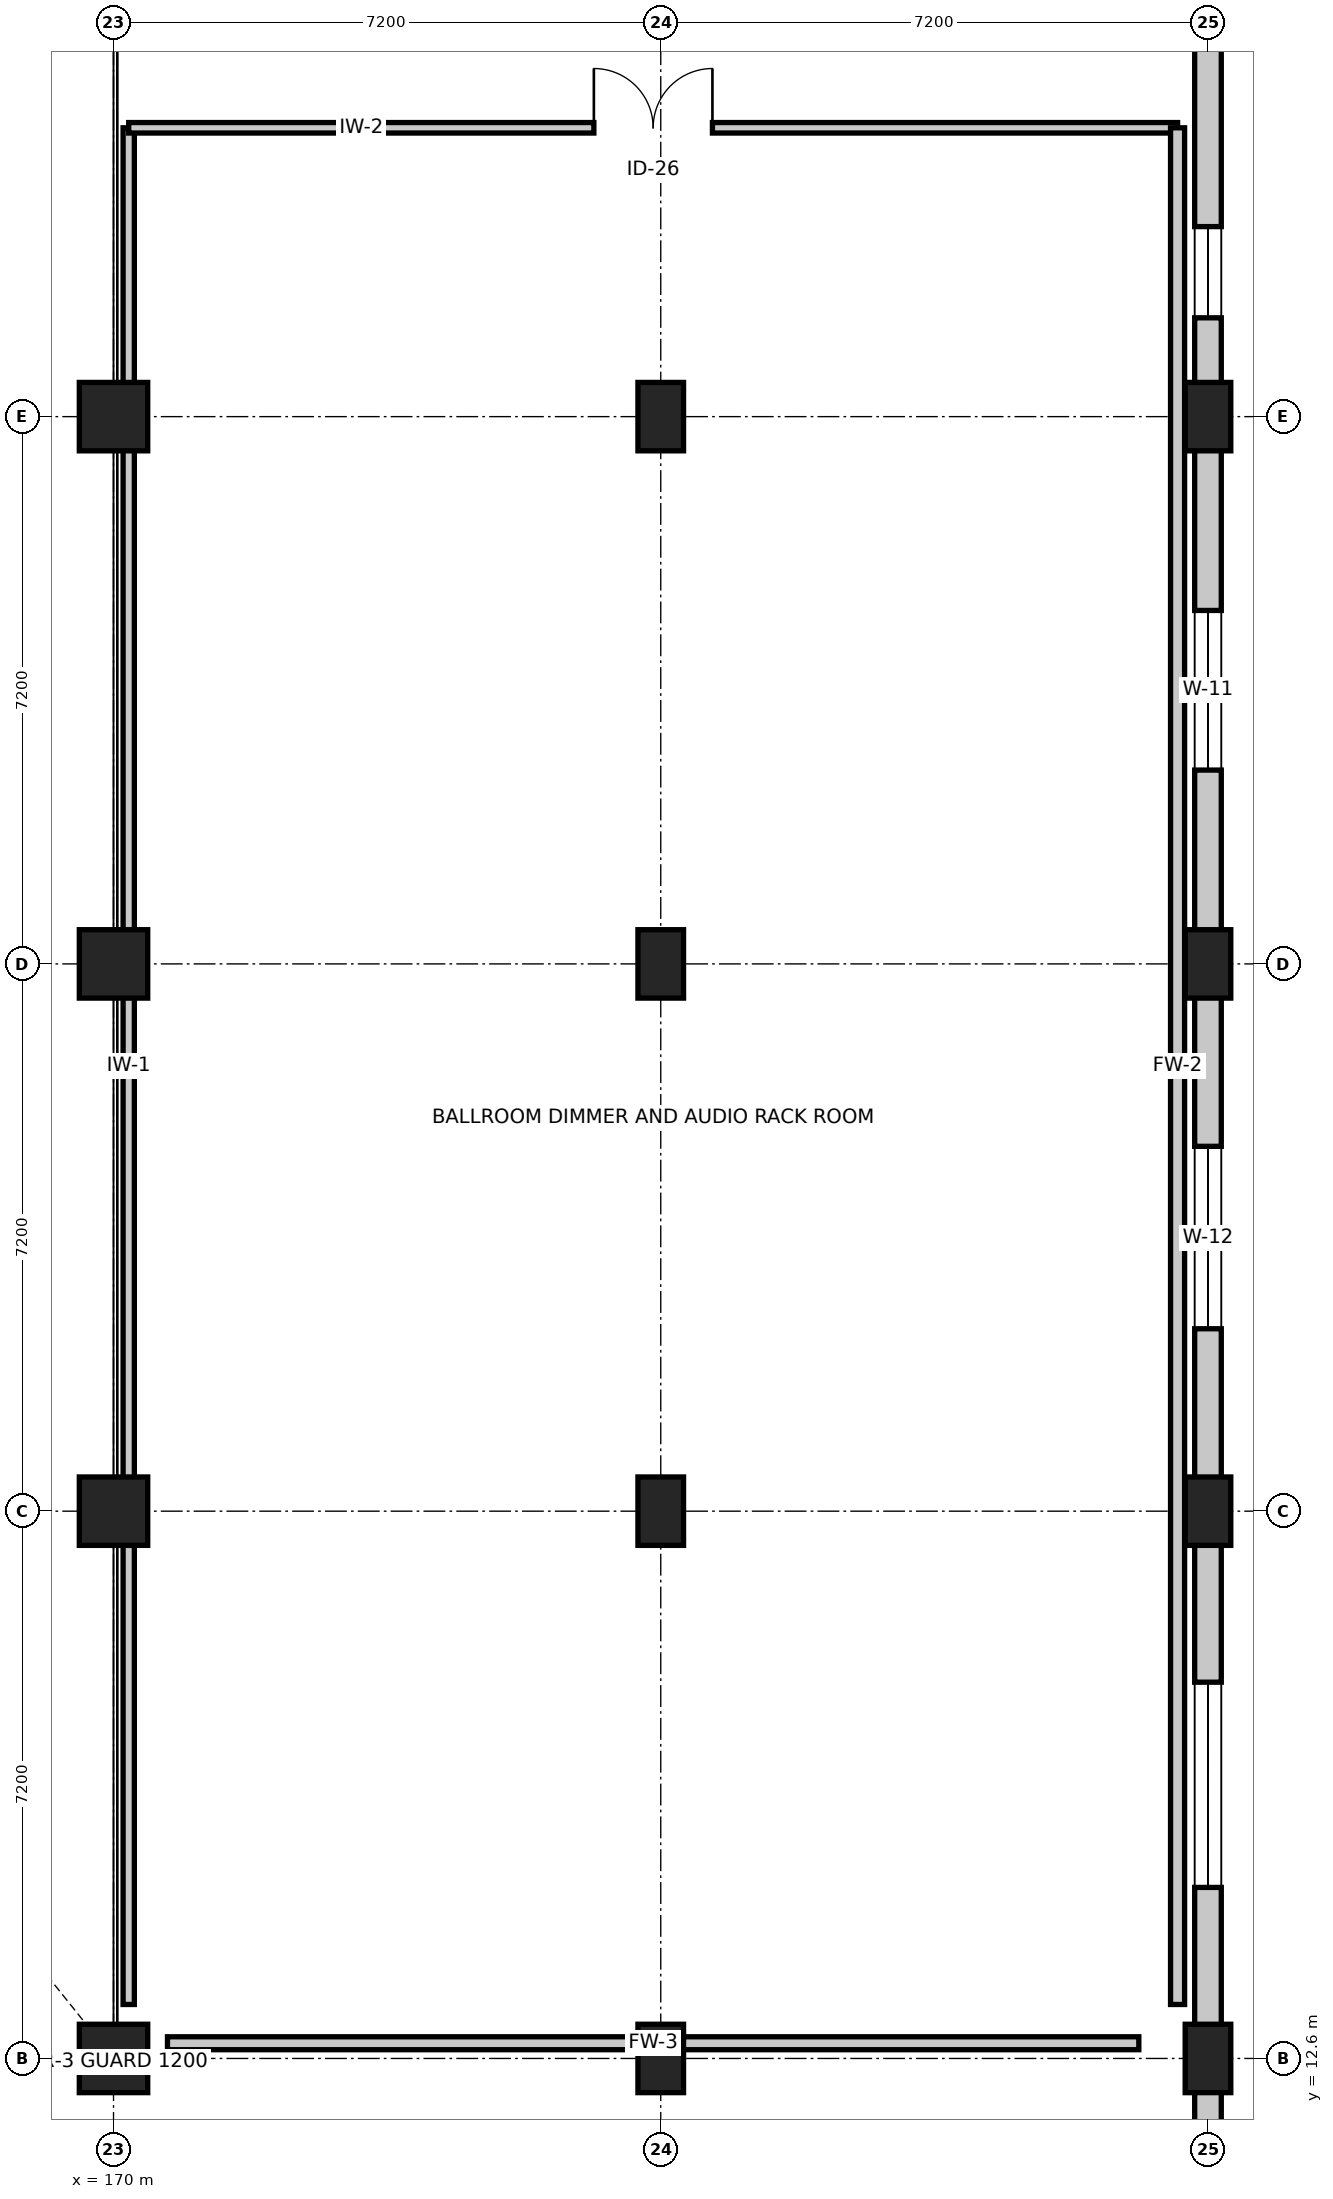
"""IFC4 building model, lengths in metres.
Left out: names, types, materials, properties, quantities, classifications, styles, units other than length and angle.
Written with IfcOpenShell. Run it as: python <this file> out.ifc"""

import sys

from ifc_helpers import new_model, si_unit, direction, frame, frame_2d, origin, origin_2d, place, context, subcontext, project, spatial, rectangle, extrude, element, fill, save


model = new_model("IFC4")
c1 = context("Model", 3, precision=1e-05, world=origin(), true_north=direction((0.0, 1.0)))
c2 = subcontext(c1, "Body", "Model", "MODEL_VIEW")
j1 = project(units=[si_unit("LENGTHUNIT", "METRE"), si_unit("PLANEANGLEUNIT", "RADIAN")], contexts=[c1])
p1 = place(None, origin())
s1 = spatial("IfcSite", under=j1, at=p1, CompositionType="ELEMENT")
p2 = place(p1, origin())
s2 = spatial("IfcBuilding", under=s1, at=p2, CompositionType="ELEMENT")
p3 = place(p2, frame((0.0, 0.0, 10.5)))
s3 = spatial("IfcBuildingStorey", under=s2, at=p3, CompositionType="ELEMENT", Elevation=10.5)
for number, where, z_axis, x_axis in (
    (1, (170.0, 12.6, 0.0), (0.0, 0.0, 1.0), (1.0, 0.0, 0.0)),
    (2, (170.0, 19.8, 0.0), (0.0, 0.0, 1.0), (1.0, 0.0, 0.0)),
    (3, (170.0, 27.0, 0.0), (0.0, 0.0, 1.0), (1.0, 0.0, 0.0)),
    (4, (170.0, 34.2, 0.0), (0.0, 0.0, 1.0), (1.0, 0.0, 0.0)),
):
    element("IfcColumn", number, at=place(p3, frame(where, z_axis=z_axis, x_axis=x_axis)), inside=s3, PredefinedType="COLUMN", context=c2, shape_type="SweptSolid", body=[
        extrude(rectangle(XDim=0.9, YDim=0.9, at=origin_2d()), origin(), (0.0, 0.0, 1.0), 4.5),
    ])
for number, where, z_axis, x_axis in (
    (5, (177.2, 12.6, 0.0), (0.0, 0.0, 1.0), (1.0, 0.0, 0.0)),
    (6, (177.2, 19.8, 0.0), (0.0, 0.0, 1.0), (1.0, 0.0, 0.0)),
    (7, (177.2, 27.0, 0.0), (0.0, 0.0, 1.0), (1.0, 0.0, 0.0)),
    (8, (177.2, 34.2, 0.0), (0.0, 0.0, 1.0), (1.0, 0.0, 0.0)),
    (9, (184.4, 12.6, 0.0), (0.0, 0.0, 1.0), (1.0, 0.0, 0.0)),
    (10, (184.4, 19.8, 0.0), (0.0, 0.0, 1.0), (1.0, 0.0, 0.0)),
    (11, (184.4, 27.0, 0.0), (0.0, 0.0, 1.0), (1.0, 0.0, 0.0)),
    (12, (184.4, 34.2, 0.0), (0.0, 0.0, 1.0), (1.0, 0.0, 0.0)),
):
    element("IfcColumn", number, at=place(p3, frame(where, z_axis=z_axis, x_axis=x_axis)), inside=s3, PredefinedType="COLUMN", context=c2, shape_type="SweptSolid", body=[
        extrude(rectangle(XDim=0.6, YDim=0.9, at=origin_2d()), origin(), (0.0, 0.0, 1.0), 4.5),
    ])
p4 = place(p3, frame((184.4, 41.4, 0.0), z_axis=(0.0, 0.0, 1.0), x_axis=(0.0, -1.0, 0.0)))
e13 = element("IfcWall", 13, at=p4, inside=s3, PredefinedType="STANDARD", context=c2, shape_type="SweptSolid", body=[
    extrude(rectangle(XDim=7.2, YDim=0.35, at=frame_2d((3.6, 0.0))), origin(), (0.0, 0.0, 1.0), 3.745),
])
p5 = place(p4, frame((1.1, 0.0, 0.9)))
e14 = element("IfcOpeningElement", 14, at=p5, cuts=e13, PredefinedType="OPENING", context=c2, shape_type="SweptSolid", body=[
    extrude(rectangle(XDim=1.2, YDim=1.8, at=frame_2d((0.6, 0.9))), frame((0.0, 0.185, 0.0), z_axis=(0.0, -1.0, 0.0), x_axis=(1.0, 0.0, 0.0)), (0.0, 0.0, 1.0), 0.37),
])
p6 = place(p4, frame((4.7, 0.0, 0.9)))
e15 = element("IfcOpeningElement", 15, at=p6, cuts=e13, PredefinedType="OPENING", context=c2, shape_type="SweptSolid", body=[
    extrude(rectangle(XDim=1.2, YDim=1.8, at=frame_2d((0.6, 0.9))), frame((0.0, 0.185, 0.0), z_axis=(0.0, -1.0, 0.0), x_axis=(1.0, 0.0, 0.0)), (0.0, 0.0, 1.0), 0.37),
])
p7 = place(p3, frame((184.4, 34.2, 0.0), z_axis=(0.0, 0.0, 1.0), x_axis=(0.0, -1.0, 0.0)))
e16 = element("IfcWall", 16, at=p7, inside=s3, PredefinedType="STANDARD", context=c2, shape_type="SweptSolid", body=[
    extrude(rectangle(XDim=7.2, YDim=0.35, at=frame_2d((3.6, 0.0))), origin(), (0.0, 0.0, 1.0), 3.745),
])
p8 = place(p7, frame((2.55, 0.0, 0.9)))
e17 = element("IfcOpeningElement", 17, at=p8, cuts=e16, PredefinedType="OPENING", context=c2, shape_type="SweptSolid", body=[
    extrude(rectangle(XDim=2.1, YDim=2.1, at=frame_2d((1.05, 1.05))), frame((0.0, 0.185, 0.0), z_axis=(0.0, -1.0, 0.0), x_axis=(1.0, 0.0, 0.0)), (0.0, 0.0, 1.0), 0.37),
])
p9 = place(p3, frame((184.4, 27.0, 0.0), z_axis=(0.0, 0.0, 1.0), x_axis=(0.0, -1.0, 0.0)))
e18 = element("IfcWall", 18, at=p9, inside=s3, PredefinedType="STANDARD", context=c2, shape_type="SweptSolid", body=[
    extrude(rectangle(XDim=7.2, YDim=0.35, at=frame_2d((3.6, 0.0))), origin(), (0.0, 0.0, 1.0), 3.745),
])
p10 = place(p9, frame((2.4, 0.0, 0.9)))
e19 = element("IfcOpeningElement", 19, at=p10, cuts=e18, PredefinedType="OPENING", context=c2, shape_type="SweptSolid", body=[
    extrude(rectangle(XDim=2.4, YDim=2.1, at=frame_2d((1.2, 1.05))), frame((0.0, 0.185, 0.0), z_axis=(0.0, -1.0, 0.0), x_axis=(1.0, 0.0, 0.0)), (0.0, 0.0, 1.0), 0.37),
])
p11 = place(p3, frame((184.4, 19.8, 0.0), z_axis=(0.0, 0.0, 1.0), x_axis=(0.0, -1.0, 0.0)))
e20 = element("IfcWall", 20, at=p11, inside=s3, PredefinedType="STANDARD", context=c2, shape_type="SweptSolid", body=[
    extrude(rectangle(XDim=7.2, YDim=0.35, at=frame_2d((3.6, 0.0))), origin(), (0.0, 0.0, 1.0), 3.745),
])
p12 = place(p11, frame((2.25, 0.0, 0.9)))
e21 = element("IfcOpeningElement", 21, at=p12, cuts=e20, PredefinedType="OPENING", context=c2, shape_type="SweptSolid", body=[
    extrude(rectangle(XDim=2.7, YDim=2.1, at=frame_2d((1.35, 1.05))), frame((0.0, 0.185, 0.0), z_axis=(0.0, -1.0, 0.0), x_axis=(1.0, 0.0, 0.0)), (0.0, 0.0, 1.0), 0.37),
])
p13 = place(p3, frame((184.4, 12.6, 0.0), z_axis=(0.0, 0.0, 1.0), x_axis=(0.0, -1.0, 0.0)))
e22 = element("IfcWall", 22, at=p13, inside=s3, PredefinedType="STANDARD", context=c2, shape_type="SweptSolid", body=[
    extrude(rectangle(XDim=7.2, YDim=0.35, at=frame_2d((3.6, 0.0))), origin(), (0.0, 0.0, 1.0), 3.745),
])
p14 = place(p13, frame((2.1, 0.0, 0.9)))
e23 = element("IfcOpeningElement", 23, at=p14, cuts=e22, PredefinedType="OPENING", context=c2, shape_type="SweptSolid", body=[
    extrude(rectangle(XDim=3.0, YDim=2.1, at=frame_2d((1.5, 1.05))), frame((0.0, 0.185, 0.0), z_axis=(0.0, -1.0, 0.0), x_axis=(1.0, 0.0, 0.0)), (0.0, 0.0, 1.0), 0.37),
])
p15 = place(p3, frame((170.2, 13.31, 0.0), z_axis=(0.0, 0.0, 1.0), x_axis=(0.0, 1.0, 0.0)))
e24 = element("IfcWall", 24, at=p15, inside=s3, PredefinedType="PARTITIONING", context=c2, shape_type="SweptSolid", body=[
    extrude(rectangle(XDim=24.69, YDim=0.148, at=frame_2d((12.345, 0.0))), origin(), (0.0, 0.0, 1.0), 3.668),
])
p16 = place(p3, frame((170.2, 38.0, 0.0), z_axis=(0.0, 0.0, 1.0), x_axis=(1.0, 0.0, 0.0)))
e25 = element("IfcWall", 25, at=p16, inside=s3, PredefinedType="PARTITIONING", context=c2, shape_type="SweptSolid", body=[
    extrude(rectangle(XDim=13.8, YDim=0.138, at=frame_2d((6.9, 0.0))), origin(), (0.0, 0.0, 1.0), 3.668),
])
p17 = place(p16, frame((6.12, 0.0, 0.0)))
e26 = element("IfcOpeningElement", 26, at=p17, cuts=e25, PredefinedType="OPENING", context=c2, shape_type="SweptSolid", body=[
    extrude(rectangle(XDim=1.56, YDim=2.26, at=frame_2d((0.78, 1.13))), frame((0.0, 0.079, 0.0), z_axis=(0.0, -1.0, 0.0), x_axis=(1.0, 0.0, 0.0)), (0.0, 0.0, 1.0), 0.158),
])
p18 = place(p3, frame((184.0, 38.0, 0.0), z_axis=(0.0, 0.0, 1.0), x_axis=(0.0, -1.0, 0.0)))
e27 = element("IfcWall", 27, at=p18, inside=s3, PredefinedType="PARTITIONING", context=c2, shape_type="SweptSolid", body=[
    extrude(rectangle(XDim=24.69, YDim=0.185, at=frame_2d((12.345, 0.0))), origin(), (0.0, 0.0, 1.0), 3.668),
])
p19 = place(p3, frame((183.49, 12.8, 0.0), z_axis=(0.0, 0.0, 1.0), x_axis=(-1.0, 0.0, 0.0)))
e28 = element("IfcWall", 28, at=p19, inside=s3, PredefinedType="PARTITIONING", context=c2, shape_type="SweptSolid", body=[
    extrude(rectangle(XDim=12.78, YDim=0.17, at=frame_2d((6.39, 0.0))), origin(), (0.0, 0.0, 1.0), 3.668),
])
p20 = place(p8, origin())
e29 = element("IfcWindow", 29, at=p20, inside=s3, PartitioningType="SINGLE_PANEL", PredefinedType="WINDOW", context=c2, shape_type="SweptSolid", body=[
    extrude(rectangle(XDim=2.1, YDim=2.1, at=frame_2d((1.05, 1.05))), frame((0.0, 0.03, 0.0), z_axis=(0.0, -1.0, 0.0), x_axis=(1.0, 0.0, 0.0)), (0.0, 0.0, 1.0), 0.06),
])
fill(e17, e29)
p21 = place(p10, origin())
e30 = element("IfcWindow", 30, at=p21, inside=s3, PartitioningType="SINGLE_PANEL", PredefinedType="WINDOW", context=c2, shape_type="SweptSolid", body=[
    extrude(rectangle(XDim=2.4, YDim=2.1, at=frame_2d((1.2, 1.05))), frame((0.0, 0.03, 0.0), z_axis=(0.0, -1.0, 0.0), x_axis=(1.0, 0.0, 0.0)), (0.0, 0.0, 1.0), 0.06),
])
fill(e19, e30)
p22 = place(p12, origin())
e31 = element("IfcWindow", 31, at=p22, inside=s3, PartitioningType="SINGLE_PANEL", PredefinedType="WINDOW", context=c2, shape_type="SweptSolid", body=[
    extrude(rectangle(XDim=2.7, YDim=2.1, at=frame_2d((1.35, 1.05))), frame((0.0, 0.03, 0.0), z_axis=(0.0, -1.0, 0.0), x_axis=(1.0, 0.0, 0.0)), (0.0, 0.0, 1.0), 0.06),
])
fill(e21, e31)
p23 = place(p17, origin())
e32 = element("IfcDoor", 32, at=p23, inside=s3, OperationType="DOUBLE_DOOR_SINGLE_SWING", PredefinedType="DOOR", context=c2, shape_type="SweptSolid", body=[
    extrude(rectangle(XDim=1.56, YDim=2.26, at=frame_2d((0.78, 1.13))), frame((0.0, 0.025, 0.0), z_axis=(0.0, -1.0, 0.0), x_axis=(1.0, 0.0, 0.0)), (0.0, 0.0, 1.0), 0.05),
])
fill(e26, e32)
p24 = place(p6, origin())
e33 = element("IfcWindow", 33, at=p24, inside=s3, PartitioningType="SINGLE_PANEL", PredefinedType="WINDOW", context=c2, shape_type="SweptSolid", body=[
    extrude(rectangle(XDim=1.2, YDim=1.8, at=frame_2d((0.6, 0.9))), frame((0.0, 0.03, 0.0), z_axis=(0.0, -1.0, 0.0), x_axis=(1.0, 0.0, 0.0)), (0.0, 0.0, 1.0), 0.06),
])
fill(e15, e33)
save(model, sys.argv[1])
